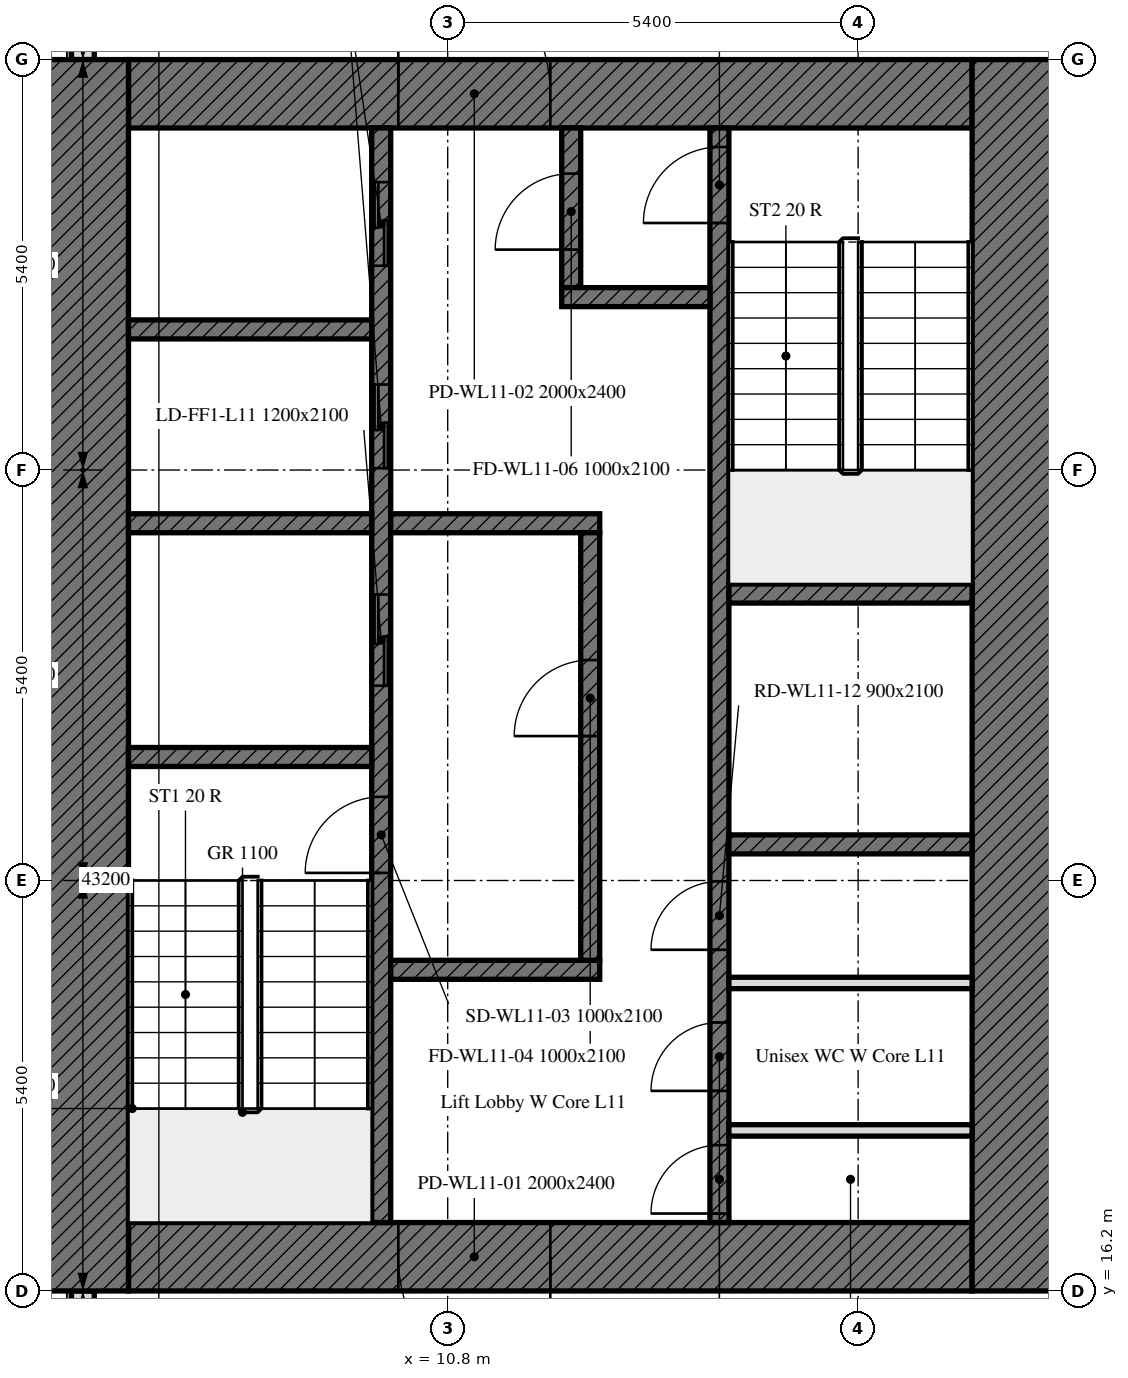
"""IFC4 building model, lengths in metres.
Left out: names, types, materials, properties, quantities, classifications, styles, units other than length and angle.
Written with IfcOpenShell. Run it as: python <this file> out.ifc"""

import sys

from ifc_helpers import new_model, si_unit, direction, frame, frame_2d, origin, place, context, subcontext, project, spatial, rectangle, extrude, element, fill, save


model = new_model("IFC4")
c1 = context("Model", 3, precision=1e-05, world=origin(), true_north=direction((0.0, 1.0)))
c2 = subcontext(c1, "Body", "Model", "MODEL_VIEW")
j1 = project(units=[si_unit("LENGTHUNIT", "METRE"), si_unit("PLANEANGLEUNIT", "RADIAN")], contexts=[c1])
p1 = place(None, origin())
s1 = spatial("IfcSite", under=j1, at=p1, CompositionType="ELEMENT")
p2 = place(p1, origin())
s2 = spatial("IfcBuilding", under=s1, at=p2, CompositionType="ELEMENT")
p3 = place(p2, frame((0.0, 0.0, 52.6)))
s3 = spatial("IfcBuildingStorey", under=s2, at=p3, CompositionType="ELEMENT", Elevation=52.6)
p4 = place(p3, frame((6.0, 37.614, 0.0), z_axis=(0.0, 0.0, 1.0), x_axis=(0.0, -1.0, 0.0)))
e1 = element("IfcWall", 1, at=p4, inside=s3, PredefinedType="SOLIDWALL", context=c2, shape_type="SweptSolid", body=[
    extrude(rectangle(XDim=5.214, YDim=0.3, at=frame_2d((2.607, 0.0))), origin(), (0.0, 0.0, 1.0), 3.5),
])
p5 = place(p3, frame((6.0, 16.2, 0.0), z_axis=(0.0, 0.0, 1.0), x_axis=(0.0, -1.0, 0.0)))
e2 = element("IfcWall", 2, at=p5, inside=s3, PredefinedType="SOLIDWALL", context=c2, shape_type="SweptSolid", body=[
    extrude(rectangle(XDim=10.614, YDim=0.3, at=frame_2d((5.307, 0.0))), origin(), (0.0, 0.0, 1.0), 3.5),
])
p6 = place(p5, frame((6.4, 0.0, 0.9)))
e3 = element("IfcOpeningElement", 3, at=p6, cuts=e2, PredefinedType="OPENING", context=c2, shape_type="SweptSolid", body=[
    extrude(rectangle(XDim=3.4, YDim=1.7, at=frame_2d((1.7, 0.85))), frame((0.0, 0.16, 0.0), z_axis=(0.0, -1.0, 0.0), x_axis=(1.0, 0.0, 0.0)), (0.0, 0.0, 1.0), 0.32),
])
p7 = place(p3, frame((17.7, 16.65, 0.0), z_axis=(0.0, 0.0, 1.0), x_axis=(-1.0, 0.0, 0.0)))
e4 = element("IfcWall", 4, at=p7, inside=s3, PredefinedType="SOLIDWALL", context=c2, shape_type="SweptSolid", body=[
    extrude(rectangle(XDim=11.1, YDim=0.9, at=frame_2d((5.55, 0.0))), origin(), (0.0, 0.0, 1.0), 3.5),
])
p8 = place(p7, frame((5.55, 0.0, 0.0)))
e5 = element("IfcOpeningElement", 5, at=p8, cuts=e4, PredefinedType="OPENING", context=c2, shape_type="SweptSolid", body=[
    extrude(rectangle(XDim=2.0, YDim=2.4, at=frame_2d((1.0, 1.2))), frame((0.0, 0.45, 0.0), z_axis=(0.0, -1.0, 0.0), x_axis=(1.0, 0.0, 0.0)), (0.0, 0.0, 1.0), 0.9),
])
p9 = place(p3, frame((6.6, 31.95, 0.0), z_axis=(0.0, 0.0, 1.0), x_axis=(1.0, 0.0, 0.0)))
e6 = element("IfcWall", 6, at=p9, inside=s3, PredefinedType="SOLIDWALL", context=c2, shape_type="SweptSolid", body=[
    extrude(rectangle(XDim=11.1, YDim=0.9, at=frame_2d((5.55, 0.0))), origin(), (0.0, 0.0, 1.0), 3.5),
])
p10 = place(p9, frame((3.55, 0.0, 0.0)))
e7 = element("IfcOpeningElement", 7, at=p10, cuts=e6, PredefinedType="OPENING", context=c2, shape_type="SweptSolid", body=[
    extrude(rectangle(XDim=2.0, YDim=2.4, at=frame_2d((1.0, 1.2))), frame((0.0, 0.45, 0.0), z_axis=(0.0, -1.0, 0.0), x_axis=(1.0, 0.0, 0.0)), (0.0, 0.0, 1.0), 0.9),
])
for number, where, z_axis, x_axis in (
    (8, (6.0, 16.2, 0.0), (0.0, 0.0, 1.0), (0.0, 1.0, 0.0)),
    (9, (18.3, 32.4, 0.0), (0.0, 0.0, 1.0), (0.0, -1.0, 0.0)),
):
    element("IfcWall", number, at=place(p3, frame(where, z_axis=z_axis, x_axis=x_axis)), inside=s3, PredefinedType="SOLIDWALL", context=c2, shape_type="SweptSolid", body=[
        extrude(rectangle(XDim=16.2, YDim=1.2, at=frame_2d((8.1, 0.0))), origin(), (0.0, 0.0, 1.0), 3.5),
    ])
p11 = place(p3, frame((9.925, 17.1, 0.0), z_axis=(0.0, 0.0, 1.0), x_axis=(0.0, 1.0, 0.0)))
e10 = element("IfcWall", 10, at=p11, inside=s3, PredefinedType="SOLIDWALL", context=c2, shape_type="SweptSolid", body=[
    extrude(rectangle(XDim=14.4, YDim=0.25, at=frame_2d((7.2, 0.0))), origin(), (0.0, 0.0, 1.0), 3.5),
])
p12 = place(p11, frame((4.6, 0.0, 0.0)))
e11 = element("IfcOpeningElement", 11, at=p12, cuts=e10, PredefinedType="OPENING", context=c2, shape_type="SweptSolid", body=[
    extrude(rectangle(XDim=1.0, YDim=2.1, at=frame_2d((0.5, 1.05))), frame((0.0, 0.125, 0.0), z_axis=(0.0, -1.0, 0.0), x_axis=(1.0, 0.0, 0.0)), (0.0, 0.0, 1.0), 0.25),
])
p13 = place(p11, frame((7.062, 0.0, 0.0)))
e12 = element("IfcOpeningElement", 12, at=p13, cuts=e10, PredefinedType="OPENING", context=c2, shape_type="SweptSolid", body=[
    extrude(rectangle(XDim=1.2, YDim=2.1, at=frame_2d((0.6, 1.05))), frame((0.0, 0.125, 0.0), z_axis=(0.0, -1.0, 0.0), x_axis=(1.0, 0.0, 0.0)), (0.0, 0.0, 1.0), 0.25),
])
p14 = place(p11, frame((9.925, 0.0, 0.0)))
e13 = element("IfcOpeningElement", 13, at=p14, cuts=e10, PredefinedType="OPENING", context=c2, shape_type="SweptSolid", body=[
    extrude(rectangle(XDim=1.1, YDim=2.1, at=frame_2d((0.55, 1.05))), frame((0.0, 0.125, 0.0), z_axis=(0.0, -1.0, 0.0), x_axis=(1.0, 0.0, 0.0)), (0.0, 0.0, 1.0), 0.25),
])
p15 = place(p11, frame((12.587, 0.0, 0.0)))
e14 = element("IfcOpeningElement", 14, at=p15, cuts=e10, PredefinedType="OPENING", context=c2, shape_type="SweptSolid", body=[
    extrude(rectangle(XDim=1.1, YDim=2.1, at=frame_2d((0.55, 1.05))), frame((0.0, 0.125, 0.0), z_axis=(0.0, -1.0, 0.0), x_axis=(1.0, 0.0, 0.0)), (0.0, 0.0, 1.0), 0.25),
])
p16 = place(p3, frame((14.375, 17.1, 0.0), z_axis=(0.0, 0.0, 1.0), x_axis=(0.0, 1.0, 0.0)))
e15 = element("IfcWall", 15, at=p16, inside=s3, PredefinedType="SOLIDWALL", context=c2, shape_type="SweptSolid", body=[
    extrude(rectangle(XDim=14.4, YDim=0.25, at=frame_2d((7.2, 0.0))), origin(), (0.0, 0.0, 1.0), 3.5),
])
p17 = place(p16, frame((13.15, 0.0, 0.0)))
e16 = element("IfcOpeningElement", 16, at=p17, cuts=e15, PredefinedType="OPENING", context=c2, shape_type="SweptSolid", body=[
    extrude(rectangle(XDim=1.0, YDim=2.1, at=frame_2d((0.5, 1.05))), frame((0.0, 0.125, 0.0), z_axis=(0.0, -1.0, 0.0), x_axis=(1.0, 0.0, 0.0)), (0.0, 0.0, 1.0), 0.25),
])
p18 = place(p16, frame((0.118, 0.0, 0.0)))
e17 = element("IfcOpeningElement", 17, at=p18, cuts=e15, PredefinedType="OPENING", context=c2, shape_type="SweptSolid", body=[
    extrude(rectangle(XDim=0.9, YDim=2.1, at=frame_2d((0.45, 1.05))), frame((0.0, 0.125, 0.0), z_axis=(0.0, -1.0, 0.0), x_axis=(1.0, 0.0, 0.0)), (0.0, 0.0, 1.0), 0.25),
])
p19 = place(p16, frame((1.732, 0.0, 0.0)))
e18 = element("IfcOpeningElement", 18, at=p19, cuts=e15, PredefinedType="OPENING", context=c2, shape_type="SweptSolid", body=[
    extrude(rectangle(XDim=0.9, YDim=2.1, at=frame_2d((0.45, 1.05))), frame((0.0, 0.125, 0.0), z_axis=(0.0, -1.0, 0.0), x_axis=(1.0, 0.0, 0.0)), (0.0, 0.0, 1.0), 0.25),
])
p20 = place(p16, frame((3.588, 0.0, 0.0)))
e19 = element("IfcOpeningElement", 19, at=p20, cuts=e15, PredefinedType="OPENING", context=c2, shape_type="SweptSolid", body=[
    extrude(rectangle(XDim=0.9, YDim=2.1, at=frame_2d((0.45, 1.05))), frame((0.0, 0.125, 0.0), z_axis=(0.0, -1.0, 0.0), x_axis=(1.0, 0.0, 0.0)), (0.0, 0.0, 1.0), 0.25),
])
for number, where, z_axis, x_axis in (
    (20, (6.6, 23.225, 0.0), (0.0, 0.0, 1.0), (1.0, 0.0, 0.0)),
    (21, (14.5, 25.375, 0.0), (0.0, 0.0, 1.0), (1.0, 0.0, 0.0)),
    (22, (14.5, 22.075, 0.0), (0.0, 0.0, 1.0), (1.0, 0.0, 0.0)),
    (23, (6.6, 26.3, 0.0), (0.0, 0.0, 1.0), (1.0, 0.0, 0.0)),
):
    element("IfcWall", number, at=place(p3, frame(where, z_axis=z_axis, x_axis=x_axis)), inside=s3, PredefinedType="SOLIDWALL", context=c2, shape_type="SweptSolid", body=[
        extrude(rectangle(XDim=3.2, YDim=0.25, at=frame_2d((1.6, 0.0))), origin(), (0.0, 0.0, 1.0), 3.5),
    ])
for number, where, z_axis, x_axis in (
    (24, (10.05, 26.3, 0.0), (0.0, 0.0, 1.0), (1.0, 0.0, 0.0)),
    (25, (10.05, 20.425, 0.0), (0.0, 0.0, 1.0), (1.0, 0.0, 0.0)),
):
    element("IfcWall", number, at=place(p3, frame(where, z_axis=z_axis, x_axis=x_axis)), inside=s3, PredefinedType="SOLIDWALL", context=c2, shape_type="SweptSolid", body=[
        extrude(rectangle(XDim=2.75, YDim=0.25, at=frame_2d((1.375, 0.0))), origin(), (0.0, 0.0, 1.0), 3.5),
    ])
p21 = place(p3, frame((12.425, 29.4, 0.0), z_axis=(0.0, 0.0, 1.0), x_axis=(0.0, 1.0, 0.0)))
e26 = element("IfcWall", 26, at=p21, inside=s3, PredefinedType="SOLIDWALL", context=c2, shape_type="SweptSolid", body=[
    extrude(rectangle(XDim=2.1, YDim=0.25, at=frame_2d((1.05, 0.0))), origin(), (0.0, 0.0, 1.0), 3.5),
])
p22 = place(p21, frame((0.5, 0.0, 0.0)))
e27 = element("IfcOpeningElement", 27, at=p22, cuts=e26, PredefinedType="OPENING", context=c2, shape_type="SweptSolid", body=[
    extrude(rectangle(XDim=1.0, YDim=2.1, at=frame_2d((0.5, 1.05))), frame((0.0, 0.125, 0.0), z_axis=(0.0, -1.0, 0.0), x_axis=(1.0, 0.0, 0.0)), (0.0, 0.0, 1.0), 0.25),
])
p23 = place(p3, frame((12.3, 29.275, 0.0), z_axis=(0.0, 0.0, 1.0), x_axis=(1.0, 0.0, 0.0)))
e28 = element("IfcWall", 28, at=p23, inside=s3, PredefinedType="SOLIDWALL", context=c2, shape_type="SweptSolid", body=[
    extrude(rectangle(XDim=1.95, YDim=0.25, at=frame_2d((0.975, 0.0))), origin(), (0.0, 0.0, 1.0), 3.5),
])
p24 = place(p3, frame((12.675, 20.55, 0.0), z_axis=(0.0, 0.0, 1.0), x_axis=(0.0, 1.0, 0.0)))
e29 = element("IfcWall", 29, at=p24, inside=s3, PredefinedType="SOLIDWALL", context=c2, shape_type="SweptSolid", body=[
    extrude(rectangle(XDim=5.625, YDim=0.25, at=frame_2d((2.812, 0.0))), origin(), (0.0, 0.0, 1.0), 3.5),
])
p25 = place(p24, frame((2.95, 0.0, 0.0)))
e30 = element("IfcOpeningElement", 30, at=p25, cuts=e29, PredefinedType="OPENING", context=c2, shape_type="SweptSolid", body=[
    extrude(rectangle(XDim=1.0, YDim=2.1, at=frame_2d((0.5, 1.05))), frame((0.0, 0.125, 0.0), z_axis=(0.0, -1.0, 0.0), x_axis=(1.0, 0.0, 0.0)), (0.0, 0.0, 1.0), 0.25),
])
p26 = place(p3, frame((6.6, 28.85, 0.0), z_axis=(0.0, 0.0, 1.0), x_axis=(1.0, 0.0, 0.0)))
e31 = element("IfcWall", 31, at=p26, inside=s3, PredefinedType="SOLIDWALL", context=c2, shape_type="SweptSolid", body=[
    extrude(rectangle(XDim=3.2, YDim=0.25, at=frame_2d((1.6, 0.0))), origin(), (0.0, 0.0, 1.0), 3.5),
])
for number, where, z_axis, x_axis in (
    (32, (14.5, 18.312, 0.0), (0.0, 0.0, 1.0), (1.0, 0.0, 0.0)),
    (33, (14.5, 20.252, 0.0), (0.0, 0.0, 1.0), (1.0, 0.0, 0.0)),
):
    element("IfcWall", number, at=place(p3, frame(where, z_axis=z_axis, x_axis=x_axis)), inside=s3, PredefinedType="PARTITIONING", context=c2, shape_type="SweptSolid", body=[
        extrude(rectangle(XDim=3.2, YDim=0.15, at=frame_2d((1.6, 0.0))), origin(), (0.0, 0.0, 1.0), 3.5),
    ])
p27 = place(p8, origin())
e34 = element("IfcDoor", 34, at=p27, inside=s3, OperationType="DOUBLE_DOOR_SINGLE_SWING", PredefinedType="DOOR", context=c2, shape_type="SweptSolid", body=[
    extrude(rectangle(XDim=2.0, YDim=2.4, at=frame_2d((1.0, 1.2))), frame((0.0, 0.025, 0.0), z_axis=(0.0, -1.0, 0.0), x_axis=(1.0, 0.0, 0.0)), (0.0, 0.0, 1.0), 0.05),
])
fill(e5, e34)
p28 = place(p10, origin())
e35 = element("IfcDoor", 35, at=p28, inside=s3, OperationType="DOUBLE_DOOR_SINGLE_SWING", PredefinedType="DOOR", context=c2, shape_type="SweptSolid", body=[
    extrude(rectangle(XDim=2.0, YDim=2.4, at=frame_2d((1.0, 1.2))), frame((0.0, 0.025, 0.0), z_axis=(0.0, -1.0, 0.0), x_axis=(1.0, 0.0, 0.0)), (0.0, 0.0, 1.0), 0.05),
])
fill(e7, e35)
p29 = place(p12, origin())
e36 = element("IfcDoor", 36, at=p29, inside=s3, OperationType="SINGLE_SWING_LEFT", PredefinedType="DOOR", context=c2, shape_type="SweptSolid", body=[
    extrude(rectangle(XDim=1.0, YDim=2.1, at=frame_2d((0.5, 1.05))), frame((0.0, 0.025, 0.0), z_axis=(0.0, -1.0, 0.0), x_axis=(1.0, 0.0, 0.0)), (0.0, 0.0, 1.0), 0.05),
])
fill(e11, e36)
p30 = place(p25, origin())
e37 = element("IfcDoor", 37, at=p30, inside=s3, OperationType="SINGLE_SWING_LEFT", PredefinedType="DOOR", context=c2, shape_type="SweptSolid", body=[
    extrude(rectangle(XDim=1.0, YDim=2.1, at=frame_2d((0.5, 1.05))), frame((0.0, 0.025, 0.0), z_axis=(0.0, -1.0, 0.0), x_axis=(1.0, 0.0, 0.0)), (0.0, 0.0, 1.0), 0.05),
])
fill(e30, e37)
p31 = place(p17, origin())
e38 = element("IfcDoor", 38, at=p31, inside=s3, OperationType="SINGLE_SWING_LEFT", PredefinedType="DOOR", context=c2, shape_type="SweptSolid", body=[
    extrude(rectangle(XDim=1.0, YDim=2.1, at=frame_2d((0.5, 1.05))), frame((0.0, 0.025, 0.0), z_axis=(0.0, -1.0, 0.0), x_axis=(1.0, 0.0, 0.0)), (0.0, 0.0, 1.0), 0.05),
])
fill(e16, e38)
p32 = place(p22, origin())
e39 = element("IfcDoor", 39, at=p32, inside=s3, OperationType="SINGLE_SWING_LEFT", PredefinedType="DOOR", context=c2, shape_type="SweptSolid", body=[
    extrude(rectangle(XDim=1.0, YDim=2.1, at=frame_2d((0.5, 1.05))), frame((0.0, 0.025, 0.0), z_axis=(0.0, -1.0, 0.0), x_axis=(1.0, 0.0, 0.0)), (0.0, 0.0, 1.0), 0.05),
])
fill(e27, e39)
p33 = place(p13, origin())
e40 = element("IfcDoor", 40, at=p33, inside=s3, OperationType="DOUBLE_DOOR_SLIDING", PredefinedType="DOOR", context=c2, shape_type="SweptSolid", body=[
    extrude(rectangle(XDim=1.2, YDim=2.1, at=frame_2d((0.6, 1.05))), frame((0.0, 0.025, 0.0), z_axis=(0.0, -1.0, 0.0), x_axis=(1.0, 0.0, 0.0)), (0.0, 0.0, 1.0), 0.05),
])
fill(e12, e40)
p34 = place(p14, origin())
e41 = element("IfcDoor", 41, at=p34, inside=s3, OperationType="DOUBLE_DOOR_SLIDING", PredefinedType="DOOR", context=c2, shape_type="SweptSolid", body=[
    extrude(rectangle(XDim=1.1, YDim=2.1, at=frame_2d((0.55, 1.05))), frame((0.0, 0.025, 0.0), z_axis=(0.0, -1.0, 0.0), x_axis=(1.0, 0.0, 0.0)), (0.0, 0.0, 1.0), 0.05),
])
fill(e13, e41)
p35 = place(p15, origin())
e42 = element("IfcDoor", 42, at=p35, inside=s3, OperationType="DOUBLE_DOOR_SLIDING", PredefinedType="DOOR", context=c2, shape_type="SweptSolid", body=[
    extrude(rectangle(XDim=1.1, YDim=2.1, at=frame_2d((0.55, 1.05))), frame((0.0, 0.025, 0.0), z_axis=(0.0, -1.0, 0.0), x_axis=(1.0, 0.0, 0.0)), (0.0, 0.0, 1.0), 0.05),
])
fill(e14, e42)
p36 = place(p18, origin())
e43 = element("IfcDoor", 43, at=p36, inside=s3, OperationType="SINGLE_SWING_LEFT", PredefinedType="DOOR", context=c2, shape_type="SweptSolid", body=[
    extrude(rectangle(XDim=0.9, YDim=2.1, at=frame_2d((0.45, 1.05))), frame((0.0, 0.025, 0.0), z_axis=(0.0, -1.0, 0.0), x_axis=(1.0, 0.0, 0.0)), (0.0, 0.0, 1.0), 0.05),
])
fill(e17, e43)
p37 = place(p19, origin())
e44 = element("IfcDoor", 44, at=p37, inside=s3, OperationType="SINGLE_SWING_LEFT", PredefinedType="DOOR", context=c2, shape_type="SweptSolid", body=[
    extrude(rectangle(XDim=0.9, YDim=2.1, at=frame_2d((0.45, 1.05))), frame((0.0, 0.025, 0.0), z_axis=(0.0, -1.0, 0.0), x_axis=(1.0, 0.0, 0.0)), (0.0, 0.0, 1.0), 0.05),
])
fill(e18, e44)
p38 = place(p20, origin())
e45 = element("IfcDoor", 45, at=p38, inside=s3, OperationType="SINGLE_SWING_LEFT", PredefinedType="DOOR", context=c2, shape_type="SweptSolid", body=[
    extrude(rectangle(XDim=0.9, YDim=2.1, at=frame_2d((0.45, 1.05))), frame((0.0, 0.025, 0.0), z_axis=(0.0, -1.0, 0.0), x_axis=(1.0, 0.0, 0.0)), (0.0, 0.0, 1.0), 0.05),
])
fill(e19, e45)
save(model, sys.argv[1])
